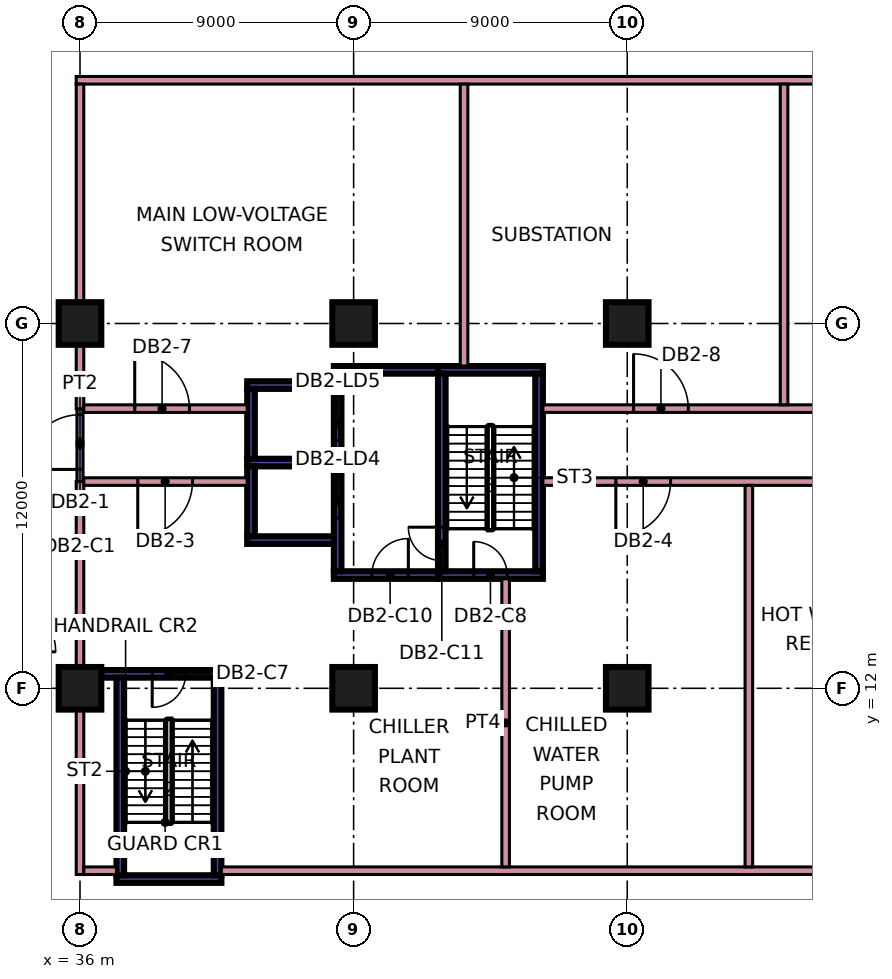
"""IFC4 building model, lengths in metres.
Left out: names, types, materials, properties, quantities, classifications, styles, units other than length and angle.
Written with IfcOpenShell. Run it as: python <this file> out.ifc"""

import sys

from ifc_helpers import new_model, si_unit, direction, frame, frame_2d, origin, origin_2d, place, context, subcontext, project, spatial, rectangle, extrude, element, fill, save


model = new_model("IFC4")
c1 = context("Model", 3, precision=1e-05, world=origin(), true_north=direction((0.0, 1.0)))
c2 = subcontext(c1, "Body", "Model", "MODEL_VIEW")
j1 = project(units=[si_unit("LENGTHUNIT", "METRE"), si_unit("PLANEANGLEUNIT", "RADIAN")], contexts=[c1])
p1 = place(None, origin())
s1 = spatial("IfcSite", under=j1, at=p1, CompositionType="ELEMENT")
p2 = place(p1, origin())
s2 = spatial("IfcBuilding", under=s1, at=p2, CompositionType="ELEMENT")
p3 = place(p2, frame((0.0, 0.0, -9.0)))
s3 = spatial("IfcBuildingStorey", under=s2, at=p3, CompositionType="ELEMENT", Elevation=-9.0)
for number, where, z_axis, x_axis in (
    (1, (36.0, 12.0, 0.0), (0.0, 0.0, 1.0), (1.0, 0.0, 0.0)),
    (2, (36.0, 24.0, 0.0), (0.0, 0.0, 1.0), (1.0, 0.0, 0.0)),
    (3, (45.0, 12.0, 0.0), (0.0, 0.0, 1.0), (1.0, 0.0, 0.0)),
    (4, (45.0, 24.0, 0.0), (0.0, 0.0, 1.0), (1.0, 0.0, 0.0)),
    (5, (54.0, 12.0, 0.0), (0.0, 0.0, 1.0), (1.0, 0.0, 0.0)),
    (6, (54.0, 24.0, 0.0), (0.0, 0.0, 1.0), (1.0, 0.0, 0.0)),
):
    element("IfcColumn", number, at=place(p3, frame(where, z_axis=z_axis, x_axis=x_axis)), inside=s3, PredefinedType="COLUMN", context=c2, shape_type="SweptSolid", body=[
        extrude(rectangle(XDim=1.4, YDim=1.4, at=origin_2d()), origin(), (0.0, 0.0, 1.0), 4.5),
    ])
p4 = place(p3, frame((37.2, 5.725, 0.0), z_axis=(0.0, 0.0, 1.0), x_axis=(1.0, 0.0, 0.0)))
e7 = element("IfcWall", 7, at=p4, inside=s3, PredefinedType="SHEAR", context=c2, shape_type="SweptSolid", body=[
    extrude(rectangle(XDim=3.45, YDim=0.25, at=frame_2d((1.725, 0.0))), origin(), (0.0, 0.0, 1.0), 4.5),
])
p5 = place(p3, frame((36.7, 12.475, 0.0), z_axis=(0.0, 0.0, 1.0), x_axis=(1.0, 0.0, 0.0)))
e8 = element("IfcWall", 8, at=p5, inside=s3, PredefinedType="SHEAR", context=c2, shape_type="SweptSolid", body=[
    extrude(rectangle(XDim=3.95, YDim=0.25, at=frame_2d((1.975, 0.0))), origin(), (0.0, 0.0, 1.0), 4.5),
])
p6 = place(p5, frame((1.675, 0.0, 0.0)))
e9 = element("IfcOpeningElement", 9, at=p6, cuts=e8, PredefinedType="OPENING", context=c2, shape_type="SweptSolid", body=[
    extrude(rectangle(XDim=1.1, YDim=2.2, at=frame_2d((0.55, 1.1))), frame((0.0, 0.135, 0.0), z_axis=(0.0, -1.0, 0.0), x_axis=(1.0, 0.0, 0.0)), (0.0, 0.0, 1.0), 0.27),
])
for number, where, z_axis, x_axis in (
    (10, (37.325, 5.85, 0.0), (0.0, 0.0, 1.0), (0.0, 1.0, 0.0)),
    (11, (40.525, 5.85, 0.0), (0.0, 0.0, 1.0), (0.0, 1.0, 0.0)),
):
    element("IfcWall", number, at=place(p3, frame(where, z_axis=z_axis, x_axis=x_axis)), inside=s3, PredefinedType="SHEAR", context=c2, shape_type="SweptSolid", body=[
        extrude(rectangle(XDim=6.5, YDim=0.25, at=frame_2d((3.25, 0.0))), origin(), (0.0, 0.0, 1.0), 4.5),
    ])
p7 = place(p3, frame((47.775, 15.725, 0.0), z_axis=(0.0, 0.0, 1.0), x_axis=(1.0, 0.0, 0.0)))
e12 = element("IfcWall", 12, at=p7, inside=s3, PredefinedType="SHEAR", context=c2, shape_type="SweptSolid", body=[
    extrude(rectangle(XDim=3.45, YDim=0.25, at=frame_2d((1.725, 0.0))), origin(), (0.0, 0.0, 1.0), 4.5),
])
p8 = place(p7, frame((1.175, 0.0, 0.0)))
e13 = element("IfcOpeningElement", 13, at=p8, cuts=e12, PredefinedType="OPENING", context=c2, shape_type="SweptSolid", body=[
    extrude(rectangle(XDim=1.1, YDim=2.2, at=frame_2d((0.55, 1.1))), frame((0.0, 0.135, 0.0), z_axis=(0.0, -1.0, 0.0), x_axis=(1.0, 0.0, 0.0)), (0.0, 0.0, 1.0), 0.27),
])
p9 = place(p3, frame((47.775, 22.475, 0.0), z_axis=(0.0, 0.0, 1.0), x_axis=(1.0, 0.0, 0.0)))
e14 = element("IfcWall", 14, at=p9, inside=s3, PredefinedType="SHEAR", context=c2, shape_type="SweptSolid", body=[
    extrude(rectangle(XDim=3.45, YDim=0.25, at=frame_2d((1.725, 0.0))), origin(), (0.0, 0.0, 1.0), 4.5),
])
p10 = place(p3, frame((47.9, 15.85, 0.0), z_axis=(0.0, 0.0, 1.0), x_axis=(0.0, 1.0, 0.0)))
e15 = element("IfcWall", 15, at=p10, inside=s3, PredefinedType="SHEAR", context=c2, shape_type="SweptSolid", body=[
    extrude(rectangle(XDim=6.5, YDim=0.25, at=frame_2d((3.25, 0.0))), origin(), (0.0, 0.0, 1.0), 4.5),
])
p11 = place(p10, frame((0.35, 0.0, 0.0)))
e16 = element("IfcOpeningElement", 16, at=p11, cuts=e15, PredefinedType="OPENING", context=c2, shape_type="SweptSolid", body=[
    extrude(rectangle(XDim=1.1, YDim=2.2, at=frame_2d((0.55, 1.1))), frame((0.0, 0.135, 0.0), z_axis=(0.0, -1.0, 0.0), x_axis=(1.0, 0.0, 0.0)), (0.0, 0.0, 1.0), 0.27),
])
p12 = place(p3, frame((51.1, 15.85, 0.0), z_axis=(0.0, 0.0, 1.0), x_axis=(0.0, 1.0, 0.0)))
e17 = element("IfcWall", 17, at=p12, inside=s3, PredefinedType="SHEAR", context=c2, shape_type="SweptSolid", body=[
    extrude(rectangle(XDim=6.5, YDim=0.25, at=frame_2d((3.25, 0.0))), origin(), (0.0, 0.0, 1.0), 4.5),
])
p13 = place(p3, frame((44.35, 15.725, 0.0), z_axis=(0.0, 0.0, 1.0), x_axis=(1.0, 0.0, 0.0)))
e18 = element("IfcWall", 18, at=p13, inside=s3, PredefinedType="SHEAR", context=c2, shape_type="SweptSolid", body=[
    extrude(rectangle(XDim=3.425, YDim=0.25, at=frame_2d((1.712, 0.0))), origin(), (0.0, 0.0, 1.0), 4.5),
])
p14 = place(p13, frame((1.25, 0.0, 0.0)))
e19 = element("IfcOpeningElement", 19, at=p14, cuts=e18, PredefinedType="OPENING", context=c2, shape_type="SweptSolid", body=[
    extrude(rectangle(XDim=1.2, YDim=2.2, at=frame_2d((0.6, 1.1))), frame((0.0, 0.135, 0.0), z_axis=(0.0, -1.0, 0.0), x_axis=(1.0, 0.0, 0.0)), (0.0, 0.0, 1.0), 0.27),
])
p15 = place(p3, frame((44.35, 22.475, 0.0), z_axis=(0.0, 0.0, 1.0), x_axis=(1.0, 0.0, 0.0)))
e20 = element("IfcWall", 20, at=p15, inside=s3, PredefinedType="SHEAR", context=c2, shape_type="SweptSolid", body=[
    extrude(rectangle(XDim=3.425, YDim=0.25, at=frame_2d((1.712, 0.0))), origin(), (0.0, 0.0, 1.0), 4.5),
])
p16 = place(p3, frame((44.475, 15.85, 0.0), z_axis=(0.0, 0.0, 1.0), x_axis=(0.0, 1.0, 0.0)))
e21 = element("IfcWall", 21, at=p16, inside=s3, PredefinedType="SHEAR", context=c2, shape_type="SweptSolid", body=[
    extrude(rectangle(XDim=6.5, YDim=0.25, at=frame_2d((3.25, 0.0))), origin(), (0.0, 0.0, 1.0), 4.5),
])
p17 = place(p16, frame((1.75, 0.0, 0.0)))
e22 = element("IfcOpeningElement", 22, at=p17, cuts=e21, PredefinedType="OPENING", context=c2, shape_type="SweptSolid", body=[
    extrude(rectangle(XDim=1.1, YDim=2.2, at=frame_2d((0.55, 1.1))), frame((0.0, 0.135, 0.0), z_axis=(0.0, -1.0, 0.0), x_axis=(1.0, 0.0, 0.0)), (0.0, 0.0, 1.0), 0.27),
])
p18 = place(p16, frame((4.3, 0.0, 0.0)))
e23 = element("IfcOpeningElement", 23, at=p18, cuts=e21, PredefinedType="OPENING", context=c2, shape_type="SweptSolid", body=[
    extrude(rectangle(XDim=1.1, YDim=2.2, at=frame_2d((0.55, 1.1))), frame((0.0, 0.135, 0.0), z_axis=(0.0, -1.0, 0.0), x_axis=(1.0, 0.0, 0.0)), (0.0, 0.0, 1.0), 0.27),
])
for number, where, z_axis, x_axis in (
    (24, (41.5, 16.875, 0.0), (0.0, 0.0, 1.0), (1.0, 0.0, 0.0)),
    (25, (41.5, 19.425, 0.0), (0.0, 0.0, 1.0), (1.0, 0.0, 0.0)),
    (26, (41.5, 21.975, 0.0), (0.0, 0.0, 1.0), (1.0, 0.0, 0.0)),
):
    element("IfcWall", number, at=place(p3, frame(where, z_axis=z_axis, x_axis=x_axis)), inside=s3, PredefinedType="SHEAR", context=c2, shape_type="SweptSolid", body=[
        extrude(rectangle(XDim=2.85, YDim=0.25, at=frame_2d((1.425, 0.0))), origin(), (0.0, 0.0, 1.0), 4.5),
    ])
for number, where, z_axis, x_axis in (
    (27, (41.625, 17.0, 0.0), (0.0, 0.0, 1.0), (0.0, 1.0, 0.0)),
    (28, (41.625, 19.55, 0.0), (0.0, 0.0, 1.0), (0.0, 1.0, 0.0)),
):
    element("IfcWall", number, at=place(p3, frame(where, z_axis=z_axis, x_axis=x_axis)), inside=s3, PredefinedType="SHEAR", context=c2, shape_type="SweptSolid", body=[
        extrude(rectangle(XDim=2.3, YDim=0.25, at=frame_2d((1.15, 0.0))), origin(), (0.0, 0.0, 1.0), 4.5),
    ])
p19 = place(p3, frame((35.875, 32.0, 0.0), z_axis=(0.0, 0.0, 1.0), x_axis=(1.0, 0.0, 0.0)))
e29 = element("IfcWall", 29, at=p19, inside=s3, PredefinedType="PARTITIONING", context=c2, shape_type="SweptSolid", body=[
    extrude(rectangle(XDim=33.809, YDim=0.25, at=frame_2d((16.905, 0.0))), origin(), (0.0, 0.0, 1.0), 4.05),
])
p20 = place(p3, frame((36.0, 5.875, 0.0), z_axis=(0.0, 0.0, 1.0), x_axis=(0.0, 1.0, 0.0)))
e30 = element("IfcWall", 30, at=p20, inside=s3, PredefinedType="PARTITIONING", context=c2, shape_type="SweptSolid", body=[
    extrude(rectangle(XDim=5.426, YDim=0.25, at=frame_2d((2.713, 0.0))), origin(), (0.0, 0.0, 1.0), 4.05),
])
p21 = place(p3, frame((36.0, 12.699, 0.0), z_axis=(0.0, 0.0, 1.0), x_axis=(0.0, 1.0, 0.0)))
e31 = element("IfcWall", 31, at=p21, inside=s3, PredefinedType="PARTITIONING", context=c2, shape_type="SweptSolid", body=[
    extrude(rectangle(XDim=6.101, YDim=0.25, at=frame_2d((3.051, 0.0))), origin(), (0.0, 0.0, 1.0), 4.05),
])
p22 = place(p3, frame((36.0, 18.8, 0.0), z_axis=(0.0, 0.0, 1.0), x_axis=(0.0, 1.0, 0.0)))
e32 = element("IfcWall", 32, at=p22, inside=s3, PredefinedType="PARTITIONING", context=c2, shape_type="SweptSolid", body=[
    extrude(rectangle(XDim=2.4, YDim=0.2, at=frame_2d((1.2, 0.0))), origin(), (0.0, 0.0, 1.0), 4.05),
])
p23 = place(p22, frame((0.4, 0.0, 0.0)))
e33 = element("IfcOpeningElement", 33, at=p23, cuts=e32, PredefinedType="OPENING", context=c2, shape_type="SweptSolid", body=[
    extrude(rectangle(XDim=1.8, YDim=2.1, at=frame_2d((0.9, 1.05))), frame((0.0, 0.11, 0.0), z_axis=(0.0, -1.0, 0.0), x_axis=(1.0, 0.0, 0.0)), (0.0, 0.0, 1.0), 0.22),
])
p24 = place(p3, frame((36.0, 21.2, 0.0), z_axis=(0.0, 0.0, 1.0), x_axis=(0.0, 1.0, 0.0)))
e34 = element("IfcWall", 34, at=p24, inside=s3, PredefinedType="PARTITIONING", context=c2, shape_type="SweptSolid", body=[
    extrude(rectangle(XDim=2.101, YDim=0.25, at=frame_2d((1.051, 0.0))), origin(), (0.0, 0.0, 1.0), 4.05),
])
p25 = place(p3, frame((36.0, 24.699, 0.0), z_axis=(0.0, 0.0, 1.0), x_axis=(0.0, 1.0, 0.0)))
e35 = element("IfcWall", 35, at=p25, inside=s3, PredefinedType="PARTITIONING", context=c2, shape_type="SweptSolid", body=[
    extrude(rectangle(XDim=7.176, YDim=0.25, at=frame_2d((3.588, 0.0))), origin(), (0.0, 0.0, 1.0), 4.05),
])
p26 = place(p3, frame((36.125, 6.0, 0.0), z_axis=(0.0, 0.0, 1.0), x_axis=(1.0, 0.0, 0.0)))
e36 = element("IfcWall", 36, at=p26, inside=s3, PredefinedType="PARTITIONING", context=c2, shape_type="SweptSolid", body=[
    extrude(rectangle(XDim=1.075, YDim=0.25, at=frame_2d((0.538, 0.0))), origin(), (0.0, 0.0, 1.0), 4.05),
])
p27 = place(p3, frame((36.125, 18.8, 0.0), z_axis=(0.0, 0.0, 1.0), x_axis=(1.0, 0.0, 0.0)))
e37 = element("IfcWall", 37, at=p27, inside=s3, PredefinedType="PARTITIONING", context=c2, shape_type="SweptSolid", body=[
    extrude(rectangle(XDim=5.375, YDim=0.25, at=frame_2d((2.688, 0.0))), origin(), (0.0, 0.0, 1.0), 4.05),
])
p28 = place(p27, frame((1.775, 0.0, 0.0)))
e38 = element("IfcOpeningElement", 38, at=p28, cuts=e37, PredefinedType="OPENING", context=c2, shape_type="SweptSolid", body=[
    extrude(rectangle(XDim=1.8, YDim=2.1, at=frame_2d((0.9, 1.05))), frame((0.0, 0.135, 0.0), z_axis=(0.0, -1.0, 0.0), x_axis=(1.0, 0.0, 0.0)), (0.0, 0.0, 1.0), 0.27),
])
p29 = place(p3, frame((36.125, 21.2, 0.0), z_axis=(0.0, 0.0, 1.0), x_axis=(1.0, 0.0, 0.0)))
e39 = element("IfcWall", 39, at=p29, inside=s3, PredefinedType="PARTITIONING", context=c2, shape_type="SweptSolid", body=[
    extrude(rectangle(XDim=5.375, YDim=0.25, at=frame_2d((2.688, 0.0))), origin(), (0.0, 0.0, 1.0), 4.05),
])
p30 = place(p29, frame((1.675, 0.0, 0.0)))
e40 = element("IfcOpeningElement", 40, at=p30, cuts=e39, PredefinedType="OPENING", context=c2, shape_type="SweptSolid", body=[
    extrude(rectangle(XDim=1.8, YDim=2.1, at=frame_2d((0.9, 1.05))), frame((0.0, 0.135, 0.0), z_axis=(0.0, -1.0, 0.0), x_axis=(1.0, 0.0, 0.0)), (0.0, 0.0, 1.0), 0.27),
])
p31 = place(p3, frame((40.65, 6.0, 0.0), z_axis=(0.0, 0.0, 1.0), x_axis=(1.0, 0.0, 0.0)))
e41 = element("IfcWall", 41, at=p31, inside=s3, PredefinedType="PARTITIONING", context=c2, shape_type="SweptSolid", body=[
    extrude(rectangle(XDim=35.475, YDim=0.25, at=frame_2d((17.738, 0.0))), origin(), (0.0, 0.0, 1.0), 4.05),
])
p32 = place(p3, frame((48.632, 22.6, 0.0), z_axis=(0.0, 0.0, 1.0), x_axis=(0.0, 1.0, 0.0)))
e42 = element("IfcWall", 42, at=p32, inside=s3, PredefinedType="PARTITIONING", context=c2, shape_type="SweptSolid", body=[
    extrude(rectangle(XDim=9.275, YDim=0.25, at=frame_2d((4.637, 0.0))), origin(), (0.0, 0.0, 1.0), 4.05),
])
p33 = place(p3, frame((50.0, 6.125, 0.0), z_axis=(0.0, 0.0, 1.0), x_axis=(0.0, 1.0, 0.0)))
e43 = element("IfcWall", 43, at=p33, inside=s3, PredefinedType="PARTITIONING", context=c2, shape_type="SweptSolid", body=[
    extrude(rectangle(XDim=9.475, YDim=0.25, at=frame_2d((4.738, 0.0))), origin(), (0.0, 0.0, 1.0), 4.05),
])
p34 = place(p3, frame((51.225, 18.8, 0.0), z_axis=(0.0, 0.0, 1.0), x_axis=(1.0, 0.0, 0.0)))
e44 = element("IfcWall", 44, at=p34, inside=s3, PredefinedType="PARTITIONING", context=c2, shape_type="SweptSolid", body=[
    extrude(rectangle(XDim=24.65, YDim=0.25, at=frame_2d((12.325, 0.0))), origin(), (0.0, 0.0, 1.0), 4.05),
])
p35 = place(p34, frame((2.4, 0.0, 0.0)))
e45 = element("IfcOpeningElement", 45, at=p35, cuts=e44, PredefinedType="OPENING", context=c2, shape_type="SweptSolid", body=[
    extrude(rectangle(XDim=1.8, YDim=2.1, at=frame_2d((0.9, 1.05))), frame((0.0, 0.135, 0.0), z_axis=(0.0, -1.0, 0.0), x_axis=(1.0, 0.0, 0.0)), (0.0, 0.0, 1.0), 0.27),
])
p36 = place(p34, frame((9.925, 0.0, 0.0)))
e46 = element("IfcOpeningElement", 46, at=p36, cuts=e44, PredefinedType="OPENING", context=c2, shape_type="SweptSolid", body=[
    extrude(rectangle(XDim=1.8, YDim=2.1, at=frame_2d((0.9, 1.05))), frame((0.0, 0.135, 0.0), z_axis=(0.0, -1.0, 0.0), x_axis=(1.0, 0.0, 0.0)), (0.0, 0.0, 1.0), 0.27),
])
p37 = place(p34, frame((18.925, 0.0, 0.0)))
e47 = element("IfcOpeningElement", 47, at=p37, cuts=e44, PredefinedType="OPENING", context=c2, shape_type="SweptSolid", body=[
    extrude(rectangle(XDim=1.8, YDim=2.1, at=frame_2d((0.9, 1.05))), frame((0.0, 0.135, 0.0), z_axis=(0.0, -1.0, 0.0), x_axis=(1.0, 0.0, 0.0)), (0.0, 0.0, 1.0), 0.27),
])
p38 = place(p3, frame((51.225, 21.2, 0.0), z_axis=(0.0, 0.0, 1.0), x_axis=(1.0, 0.0, 0.0)))
e48 = element("IfcWall", 48, at=p38, inside=s3, PredefinedType="PARTITIONING", context=c2, shape_type="SweptSolid", body=[
    extrude(rectangle(XDim=18.459, YDim=0.25, at=frame_2d((9.229, 0.0))), origin(), (0.0, 0.0, 1.0), 4.05),
])
p39 = place(p38, frame((2.983, 0.0, 0.0)))
e49 = element("IfcOpeningElement", 49, at=p39, cuts=e48, PredefinedType="OPENING", context=c2, shape_type="SweptSolid", body=[
    extrude(rectangle(XDim=1.8, YDim=2.1, at=frame_2d((0.9, 1.05))), frame((0.0, 0.135, 0.0), z_axis=(0.0, -1.0, 0.0), x_axis=(1.0, 0.0, 0.0)), (0.0, 0.0, 1.0), 0.27),
])
p40 = place(p38, frame((12.259, 0.0, 0.0)))
e50 = element("IfcOpeningElement", 50, at=p40, cuts=e48, PredefinedType="OPENING", context=c2, shape_type="SweptSolid", body=[
    extrude(rectangle(XDim=1.8, YDim=2.1, at=frame_2d((0.9, 1.05))), frame((0.0, 0.135, 0.0), z_axis=(0.0, -1.0, 0.0), x_axis=(1.0, 0.0, 0.0)), (0.0, 0.0, 1.0), 0.27),
])
p41 = place(p3, frame((58.0, 6.125, 0.0), z_axis=(0.0, 0.0, 1.0), x_axis=(0.0, 1.0, 0.0)))
e51 = element("IfcWall", 51, at=p41, inside=s3, PredefinedType="PARTITIONING", context=c2, shape_type="SweptSolid", body=[
    extrude(rectangle(XDim=12.55, YDim=0.25, at=frame_2d((6.275, 0.0))), origin(), (0.0, 0.0, 1.0), 4.05),
])
p42 = place(p3, frame((59.158, 21.325, 0.0), z_axis=(0.0, 0.0, 1.0), x_axis=(0.0, 1.0, 0.0)))
e52 = element("IfcWall", 52, at=p42, inside=s3, PredefinedType="PARTITIONING", context=c2, shape_type="SweptSolid", body=[
    extrude(rectangle(XDim=10.55, YDim=0.25, at=frame_2d((5.275, 0.0))), origin(), (0.0, 0.0, 1.0), 4.05),
])
p43 = place(p6, frame((1.1, 0.0, 0.0), z_axis=(0.0, 0.0, 1.0), x_axis=(-1.0, 0.0, 0.0)))
e53 = element("IfcDoor", 53, at=p43, inside=s3, OperationType="SINGLE_SWING_LEFT", PredefinedType="DOOR", context=c2, shape_type="SweptSolid", body=[
    extrude(rectangle(XDim=1.1, YDim=2.2, at=frame_2d((0.55, 1.1))), frame((0.0, 0.025, 0.0), z_axis=(0.0, -1.0, 0.0), x_axis=(1.0, 0.0, 0.0)), (0.0, 0.0, 1.0), 0.05),
])
fill(e9, e53)
p44 = place(p8, origin())
e54 = element("IfcDoor", 54, at=p44, inside=s3, OperationType="SINGLE_SWING_LEFT", PredefinedType="DOOR", context=c2, shape_type="SweptSolid", body=[
    extrude(rectangle(XDim=1.1, YDim=2.2, at=frame_2d((0.55, 1.1))), frame((0.0, 0.025, 0.0), z_axis=(0.0, -1.0, 0.0), x_axis=(1.0, 0.0, 0.0)), (0.0, 0.0, 1.0), 0.05),
])
fill(e13, e54)
p45 = place(p14, frame((1.2, 0.0, 0.0), z_axis=(0.0, 0.0, 1.0), x_axis=(-1.0, 0.0, 0.0)))
e55 = element("IfcDoor", 55, at=p45, inside=s3, OperationType="SINGLE_SWING_RIGHT", PredefinedType="DOOR", context=c2, shape_type="SweptSolid", body=[
    extrude(rectangle(XDim=1.2, YDim=2.2, at=frame_2d((0.6, 1.1))), frame((0.0, 0.025, 0.0), z_axis=(0.0, -1.0, 0.0), x_axis=(1.0, 0.0, 0.0)), (0.0, 0.0, 1.0), 0.05),
])
fill(e19, e55)
p46 = place(p11, frame((1.1, 0.0, 0.0), z_axis=(0.0, 0.0, 1.0), x_axis=(-1.0, 0.0, 0.0)))
e56 = element("IfcDoor", 56, at=p46, inside=s3, OperationType="SINGLE_SWING_RIGHT", PredefinedType="DOOR", context=c2, shape_type="SweptSolid", body=[
    extrude(rectangle(XDim=1.1, YDim=2.2, at=frame_2d((0.55, 1.1))), frame((0.0, 0.025, 0.0), z_axis=(0.0, -1.0, 0.0), x_axis=(1.0, 0.0, 0.0)), (0.0, 0.0, 1.0), 0.05),
])
fill(e16, e56)
p47 = place(p17, origin())
e57 = element("IfcDoor", 57, at=p47, inside=s3, OperationType="DOUBLE_DOOR_SLIDING", PredefinedType="DOOR", context=c2, shape_type="SweptSolid", body=[
    extrude(rectangle(XDim=1.1, YDim=2.2, at=frame_2d((0.55, 1.1))), frame((0.0, 0.025, 0.0), z_axis=(0.0, -1.0, 0.0), x_axis=(1.0, 0.0, 0.0)), (0.0, 0.0, 1.0), 0.05),
])
fill(e22, e57)
p48 = place(p18, origin())
e58 = element("IfcDoor", 58, at=p48, inside=s3, OperationType="DOUBLE_DOOR_SLIDING", PredefinedType="DOOR", context=c2, shape_type="SweptSolid", body=[
    extrude(rectangle(XDim=1.1, YDim=2.2, at=frame_2d((0.55, 1.1))), frame((0.0, 0.025, 0.0), z_axis=(0.0, -1.0, 0.0), x_axis=(1.0, 0.0, 0.0)), (0.0, 0.0, 1.0), 0.05),
])
fill(e23, e58)
p49 = place(p23, origin())
e59 = element("IfcDoor", 59, at=p49, inside=s3, OperationType="DOUBLE_DOOR_SINGLE_SWING", PredefinedType="DOOR", context=c2, shape_type="SweptSolid", body=[
    extrude(rectangle(XDim=1.8, YDim=2.1, at=frame_2d((0.9, 1.05))), frame((0.0, 0.025, 0.0), z_axis=(0.0, -1.0, 0.0), x_axis=(1.0, 0.0, 0.0)), (0.0, 0.0, 1.0), 0.05),
])
fill(e33, e59)
p50 = place(p28, frame((1.8, 0.0, 0.0), z_axis=(0.0, 0.0, 1.0), x_axis=(-1.0, 0.0, 0.0)))
e60 = element("IfcDoor", 60, at=p50, inside=s3, OperationType="DOUBLE_DOOR_SINGLE_SWING", PredefinedType="DOOR", context=c2, shape_type="SweptSolid", body=[
    extrude(rectangle(XDim=1.8, YDim=2.1, at=frame_2d((0.9, 1.05))), frame((0.0, 0.025, 0.0), z_axis=(0.0, -1.0, 0.0), x_axis=(1.0, 0.0, 0.0)), (0.0, 0.0, 1.0), 0.05),
])
fill(e38, e60)
p51 = place(p35, frame((1.8, 0.0, 0.0), z_axis=(0.0, 0.0, 1.0), x_axis=(-1.0, 0.0, 0.0)))
e61 = element("IfcDoor", 61, at=p51, inside=s3, OperationType="DOUBLE_DOOR_SINGLE_SWING", PredefinedType="DOOR", context=c2, shape_type="SweptSolid", body=[
    extrude(rectangle(XDim=1.8, YDim=2.1, at=frame_2d((0.9, 1.05))), frame((0.0, 0.025, 0.0), z_axis=(0.0, -1.0, 0.0), x_axis=(1.0, 0.0, 0.0)), (0.0, 0.0, 1.0), 0.05),
])
fill(e45, e61)
p52 = place(p30, origin())
e62 = element("IfcDoor", 62, at=p52, inside=s3, OperationType="DOUBLE_DOOR_SINGLE_SWING", PredefinedType="DOOR", context=c2, shape_type="SweptSolid", body=[
    extrude(rectangle(XDim=1.8, YDim=2.1, at=frame_2d((0.9, 1.05))), frame((0.0, 0.025, 0.0), z_axis=(0.0, -1.0, 0.0), x_axis=(1.0, 0.0, 0.0)), (0.0, 0.0, 1.0), 0.05),
])
fill(e40, e62)
p53 = place(p39, origin())
e63 = element("IfcDoor", 63, at=p53, inside=s3, OperationType="DOUBLE_DOOR_SINGLE_SWING", PredefinedType="DOOR", context=c2, shape_type="SweptSolid", body=[
    extrude(rectangle(XDim=1.8, YDim=2.1, at=frame_2d((0.9, 1.05))), frame((0.0, 0.025, 0.0), z_axis=(0.0, -1.0, 0.0), x_axis=(1.0, 0.0, 0.0)), (0.0, 0.0, 1.0), 0.05),
])
fill(e49, e63)
save(model, sys.argv[1])
